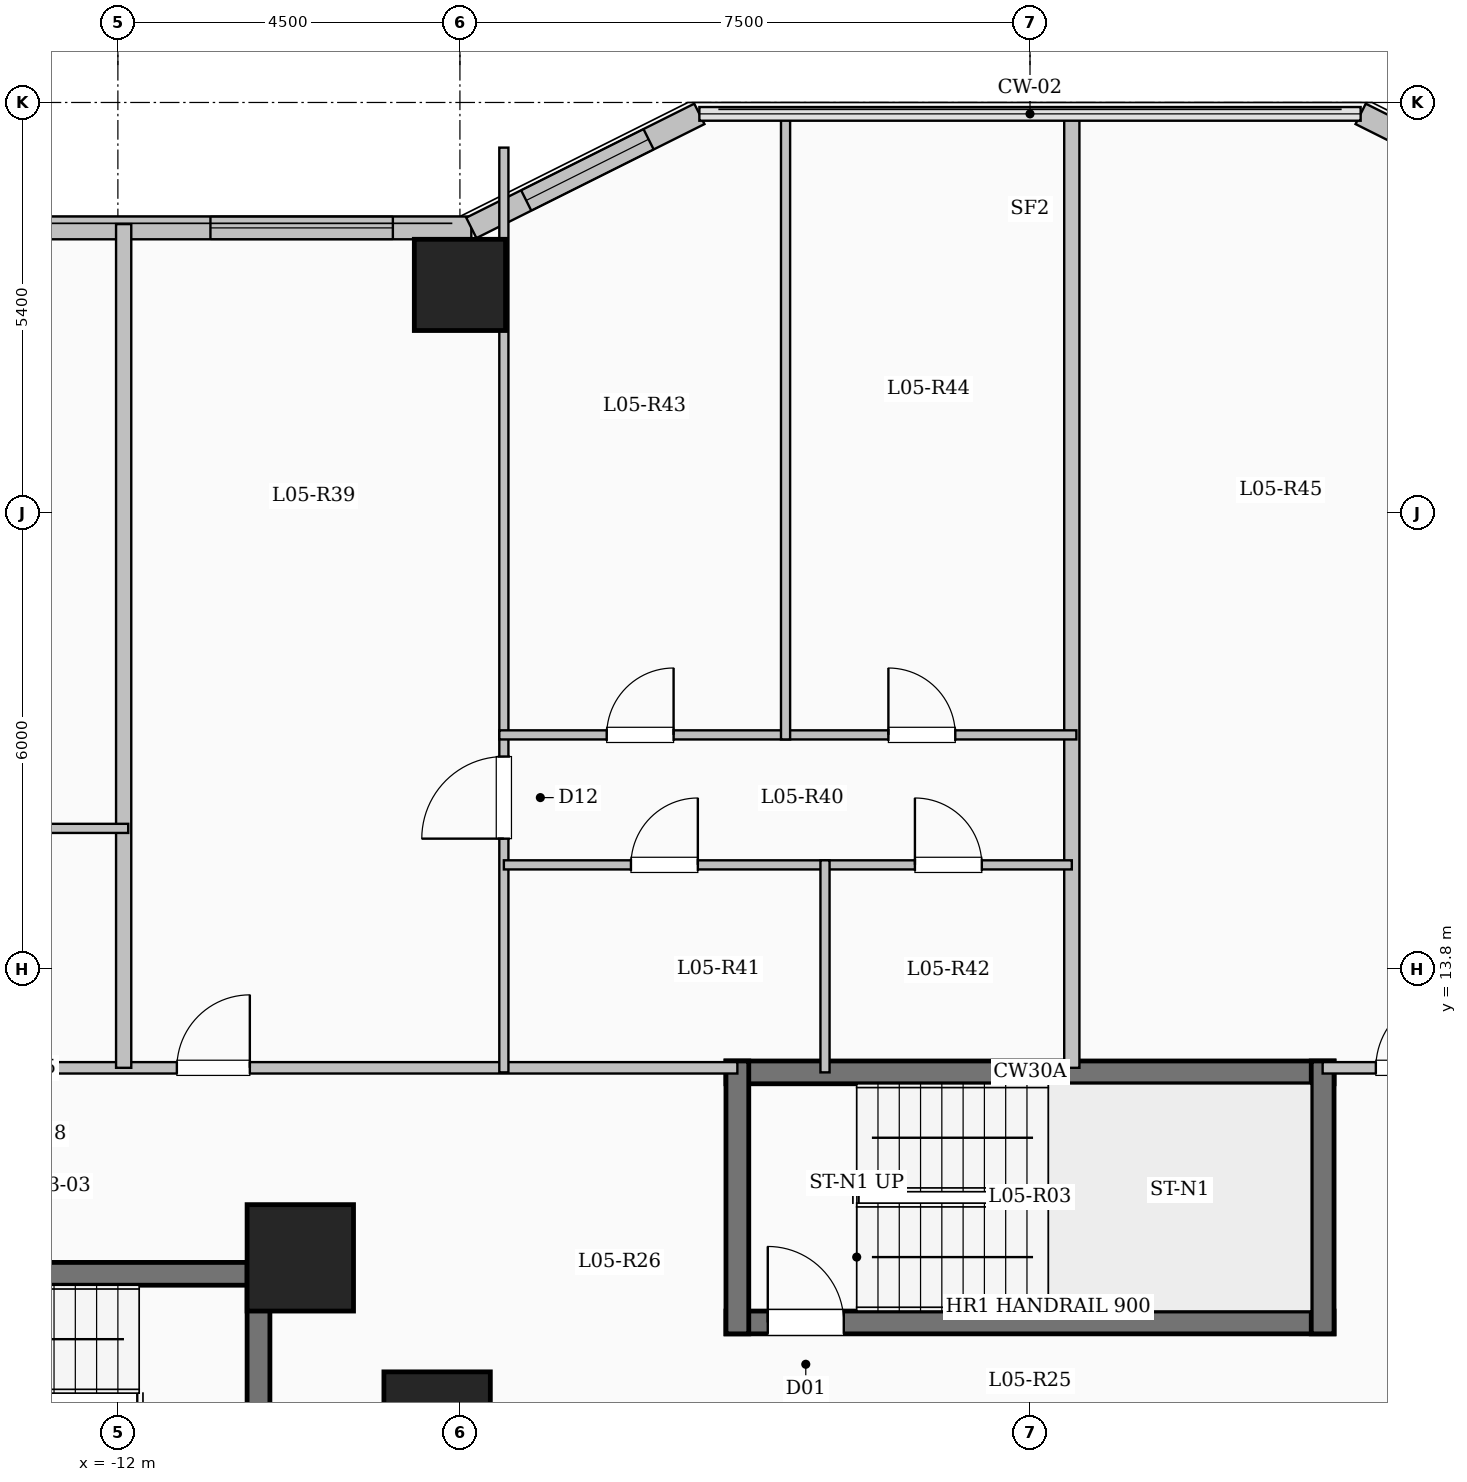
"""IFC4 building model, lengths in metres.
Left out: names, types, materials, properties, quantities, classifications, styles, units other than length and angle.
Written with IfcOpenShell. Run it as: python <this file> out.ifc"""

import sys

from ifc_helpers import new_model, si_unit, direction, frame, frame_2d, origin, origin_2d, place, context, subcontext, project, spatial, rectangle, extrude, element, fill, save


model = new_model("IFC4")
c1 = context("Model", 3, precision=1e-05, world=origin(), true_north=direction((0.0, 1.0)))
c2 = subcontext(c1, "Body", "Model", "MODEL_VIEW")
j1 = project(units=[si_unit("LENGTHUNIT", "METRE"), si_unit("PLANEANGLEUNIT", "RADIAN")], contexts=[c1])
p1 = place(None, origin())
s1 = spatial("IfcSite", under=j1, at=p1, CompositionType="ELEMENT")
p2 = place(p1, origin())
s2 = spatial("IfcBuilding", under=s1, at=p2, CompositionType="ELEMENT")
p3 = place(p2, frame((0.0, 0.0, 24.0)))
s3 = spatial("IfcBuildingStorey", under=s2, at=p3, CompositionType="ELEMENT", Elevation=24.0)
for number, where, z_axis, x_axis in (
    (1, (-7.8, 7.8, 0.0), (0.0, 0.0, 1.0), (1.0, 0.0, 0.0)),
    (2, (-9.6, 10.0, 0.0), (0.0, 0.0, 1.0), (1.0, 0.0, 0.0)),
):
    element("IfcColumn", number, at=place(p3, frame(where, z_axis=z_axis, x_axis=x_axis)), inside=s3, PredefinedType="COLUMN", context=c2, shape_type="SweptSolid", body=[
        extrude(rectangle(XDim=1.4, YDim=1.4, at=origin_2d()), origin(), (0.0, 0.0, 1.0), 3.35),
    ])
p4 = place(p3, frame((-7.5, 22.8, 0.0), z_axis=(0.0, 0.0, 1.0), x_axis=(1.0, 0.0, 0.0)))
e3 = element("IfcColumn", 3, at=p4, inside=s3, PredefinedType="COLUMN", context=c2, shape_type="SweptSolid", body=[
    extrude(rectangle(XDim=1.2, YDim=1.2, at=origin_2d()), origin(), (0.0, 0.0, 1.0), 3.35),
])
p5 = place(p3, frame((-22.65, 23.55, 0.0), z_axis=(0.0, 0.0, 1.0), x_axis=(1.0, 0.0, 0.0)))
e4 = element("IfcWall", 4, at=p5, inside=s3, PredefinedType="SOLIDWALL", context=c2, shape_type="SweptSolid", body=[
    extrude(rectangle(XDim=15.3, YDim=0.3, at=frame_2d((7.65, 0.0))), origin(), (0.0, 0.0, 1.0), 3.1),
])
p6 = place(p5, frame((1.81, 0.0, 0.9)))
e5 = element("IfcOpeningElement", 5, at=p6, cuts=e4, PredefinedType="OPENING", context=c2, shape_type="SweptSolid", body=[
    extrude(rectangle(XDim=2.4, YDim=1.8, at=frame_2d((1.2, 0.9))), frame((0.0, 0.16, 0.0), z_axis=(0.0, -1.0, 0.0), x_axis=(1.0, 0.0, 0.0)), (0.0, 0.0, 1.0), 0.32),
])
p7 = place(p5, frame((7.427, 0.0, 0.9)))
e6 = element("IfcOpeningElement", 6, at=p7, cuts=e4, PredefinedType="OPENING", context=c2, shape_type="SweptSolid", body=[
    extrude(rectangle(XDim=1.8, YDim=1.65, at=frame_2d((0.9, 0.825))), frame((0.0, 0.16, 0.0), z_axis=(0.0, -1.0, 0.0), x_axis=(1.0, 0.0, 0.0)), (0.0, 0.0, 1.0), 0.32),
])
p8 = place(p5, frame((11.868, 0.0, 0.9)))
e7 = element("IfcOpeningElement", 7, at=p8, cuts=e4, PredefinedType="OPENING", context=c2, shape_type="SweptSolid", body=[
    extrude(rectangle(XDim=2.4, YDim=1.8, at=frame_2d((1.2, 0.9))), frame((0.0, 0.16, 0.0), z_axis=(0.0, -1.0, 0.0), x_axis=(1.0, 0.0, 0.0)), (0.0, 0.0, 1.0), 0.32),
])
p9 = place(p3, frame((-7.35, 23.55, 0.0), z_axis=(0.0, 0.0, 1.0), x_axis=(0.894427191, 0.4472135955, 0.0)))
e8 = element("IfcWall", 8, at=p9, inside=s3, PredefinedType="SOLIDWALL", context=c2, shape_type="SweptSolid", body=[
    extrude(rectangle(XDim=3.354, YDim=0.3, at=frame_2d((1.677, 0.0))), origin(), (0.0, 0.0, 1.0), 3.1),
])
p10 = place(p9, frame((0.807, 0.0, 0.9)))
e9 = element("IfcOpeningElement", 9, at=p10, cuts=e8, PredefinedType="OPENING", context=c2, shape_type="SweptSolid", body=[
    extrude(rectangle(XDim=1.8, YDim=1.65, at=frame_2d((0.9, 0.825))), frame((0.0, 0.16, 0.0), z_axis=(0.0, -1.0, 0.0), x_axis=(1.0, 0.0, 0.0)), (0.0, 0.0, 1.0), 0.32),
])
p11 = place(p3, frame((4.35, 25.05, 0.0), z_axis=(0.0, 0.0, 1.0), x_axis=(0.894427191, -0.4472135955, 0.0)))
e10 = element("IfcWall", 10, at=p11, inside=s3, PredefinedType="SOLIDWALL", context=c2, shape_type="SweptSolid", body=[
    extrude(rectangle(XDim=3.354, YDim=0.3, at=frame_2d((1.677, 0.0))), origin(), (0.0, 0.0, 1.0), 3.1),
])
p12 = place(p11, frame((2.308, 0.0, 0.95)))
e11 = element("IfcOpeningElement", 11, at=p12, cuts=e10, PredefinedType="OPENING", context=c2, shape_type="SweptSolid", body=[
    extrude(rectangle(XDim=0.7, YDim=1.5, at=frame_2d((0.35, 0.75))), frame((0.0, 0.16, 0.0), z_axis=(0.0, -1.0, 0.0), x_axis=(1.0, 0.0, 0.0)), (0.0, 0.0, 1.0), 0.32),
])
p13 = place(p3, frame((-18.0, 9.79, 0.0), z_axis=(0.0, 0.0, 1.0), x_axis=(1.0, 0.0, 0.0)))
e12 = element("IfcWall", 12, at=p13, inside=s3, PredefinedType="SHEAR", context=c2, shape_type="SweptSolid", body=[
    extrude(rectangle(XDim=8.0, YDim=0.3, at=frame_2d((4.0, 0.0))), origin(), (0.0, 0.0, 1.0), 3.35),
])
p14 = place(p3, frame((-10.15, 6.35, 0.0), z_axis=(0.0, 0.0, 1.0), x_axis=(0.0, 1.0, 0.0)))
e13 = element("IfcWall", 13, at=p14, inside=s3, PredefinedType="SHEAR", context=c2, shape_type="SweptSolid", body=[
    extrude(rectangle(XDim=3.59, YDim=0.3, at=frame_2d((1.795, 0.0))), origin(), (0.0, 0.0, 1.0), 3.35),
])
p15 = place(p3, frame((-4.0, 12.44, 0.0), z_axis=(0.0, 0.0, 1.0), x_axis=(1.0, 0.0, 0.0)))
e14 = element("IfcWall", 14, at=p15, inside=s3, PredefinedType="SHEAR", context=c2, shape_type="SweptSolid", body=[
    extrude(rectangle(XDim=8.0, YDim=0.3, at=frame_2d((4.0, 0.0))), origin(), (0.0, 0.0, 1.0), 3.35),
])
p16 = place(p3, frame((-4.0, 9.15, 0.0), z_axis=(0.0, 0.0, 1.0), x_axis=(1.0, 0.0, 0.0)))
e15 = element("IfcWall", 15, at=p16, inside=s3, PredefinedType="SHEAR", context=c2, shape_type="SweptSolid", body=[
    extrude(rectangle(XDim=8.0, YDim=0.3, at=frame_2d((4.0, 0.0))), origin(), (0.0, 0.0, 1.0), 3.35),
])
p17 = place(p16, frame((0.55, 0.0, 0.0)))
e16 = element("IfcOpeningElement", 16, at=p17, cuts=e15, PredefinedType="OPENING", context=c2, shape_type="SweptSolid", body=[
    extrude(rectangle(XDim=1.0, YDim=2.15, at=frame_2d((0.5, 1.075))), frame((0.0, 0.16, 0.0), z_axis=(0.0, -1.0, 0.0), x_axis=(1.0, 0.0, 0.0)), (0.0, 0.0, 1.0), 0.32),
])
for number, where, z_axis, x_axis in (
    (17, (-3.85, 9.0, 0.0), (0.0, 0.0, 1.0), (0.0, 1.0, 0.0)),
    (18, (3.85, 9.0, 0.0), (0.0, 0.0, 1.0), (0.0, 1.0, 0.0)),
):
    element("IfcWall", number, at=place(p3, frame(where, z_axis=z_axis, x_axis=x_axis)), inside=s3, PredefinedType="SHEAR", context=c2, shape_type="SweptSolid", body=[
        extrude(rectangle(XDim=3.59, YDim=0.3, at=frame_2d((1.795, 0.0))), origin(), (0.0, 0.0, 1.0), 3.35),
    ])
p18 = place(p3, frame((-22.55, 12.5, 0.0), z_axis=(0.0, 0.0, 1.0), x_axis=(1.0, 0.0, 0.0)))
e19 = element("IfcWall", 19, at=p18, inside=s3, PredefinedType="PARTITIONING", context=c2, shape_type="SweptSolid", body=[
    extrude(rectangle(XDim=18.7, YDim=0.15, at=frame_2d((9.35, 0.0))), origin(), (0.0, 0.0, 1.0), 3.1),
])
p19 = place(p18, frame((0.7, 0.0, 0.0)))
e20 = element("IfcOpeningElement", 20, at=p19, cuts=e19, PredefinedType="OPENING", context=c2, shape_type="SweptSolid", body=[
    extrude(rectangle(XDim=0.96, YDim=2.15, at=frame_2d((0.48, 1.075))), frame((0.0, 0.085, 0.0), z_axis=(0.0, -1.0, 0.0), x_axis=(1.0, 0.0, 0.0)), (0.0, 0.0, 1.0), 0.17),
])
p20 = place(p18, frame((11.326, 0.0, 0.0)))
e21 = element("IfcOpeningElement", 21, at=p20, cuts=e19, PredefinedType="OPENING", context=c2, shape_type="SweptSolid", body=[
    extrude(rectangle(XDim=0.96, YDim=2.15, at=frame_2d((0.48, 1.075))), frame((0.0, 0.085, 0.0), z_axis=(0.0, -1.0, 0.0), x_axis=(1.0, 0.0, 0.0)), (0.0, 0.0, 1.0), 0.17),
])
p21 = place(p3, frame((3.85, 12.5, 0.0), z_axis=(0.0, 0.0, 1.0), x_axis=(1.0, 0.0, 0.0)))
e22 = element("IfcWall", 22, at=p21, inside=s3, PredefinedType="PARTITIONING", context=c2, shape_type="SweptSolid", body=[
    extrude(rectangle(XDim=18.7, YDim=0.15, at=frame_2d((9.35, 0.0))), origin(), (0.0, 0.0, 1.0), 3.1),
])
p22 = place(p21, frame((0.7, 0.0, 0.0)))
e23 = element("IfcOpeningElement", 23, at=p22, cuts=e22, PredefinedType="OPENING", context=c2, shape_type="SweptSolid", body=[
    extrude(rectangle(XDim=0.96, YDim=2.15, at=frame_2d((0.48, 1.075))), frame((0.0, 0.085, 0.0), z_axis=(0.0, -1.0, 0.0), x_axis=(1.0, 0.0, 0.0)), (0.0, 0.0, 1.0), 0.17),
])
p23 = place(p21, frame((8.4, 0.0, 0.0)))
e24 = element("IfcOpeningElement", 24, at=p23, cuts=e22, PredefinedType="OPENING", context=c2, shape_type="SweptSolid", body=[
    extrude(rectangle(XDim=0.96, YDim=2.15, at=frame_2d((0.48, 1.075))), frame((0.0, 0.085, 0.0), z_axis=(0.0, -1.0, 0.0), x_axis=(1.0, 0.0, 0.0)), (0.0, 0.0, 1.0), 0.17),
])
p24 = place(p3, frame((0.55, 12.5, 0.0), z_axis=(0.0, 0.0, 1.0), x_axis=(0.0, 1.0, 0.0)))
e25 = element("IfcWall", 25, at=p24, inside=s3, PredefinedType="SOLIDWALL", context=c2, shape_type="SweptSolid", body=[
    extrude(rectangle(XDim=12.58, YDim=0.2, at=frame_2d((6.29, 0.0))), origin(), (0.0, 0.0, 1.0), 3.1),
])
p25 = place(p3, frame((-11.924, 12.5, 0.0), z_axis=(0.0, 0.0, 1.0), x_axis=(0.0, 1.0, 0.0)))
e26 = element("IfcWall", 26, at=p25, inside=s3, PredefinedType="SOLIDWALL", context=c2, shape_type="SweptSolid", body=[
    extrude(rectangle(XDim=11.1, YDim=0.2, at=frame_2d((5.55, 0.0))), origin(), (0.0, 0.0, 1.0), 3.1),
])
p26 = place(p3, frame((-16.744, 15.65, 0.0), z_axis=(0.0, 0.0, 1.0), x_axis=(1.0, 0.0, 0.0)))
e27 = element("IfcWall", 27, at=p26, inside=s3, PredefinedType="PARTITIONING", context=c2, shape_type="SweptSolid", body=[
    extrude(rectangle(XDim=4.88, YDim=0.12, at=frame_2d((2.44, 0.0))), origin(), (0.0, 0.0, 1.0), 3.1),
])
p27 = place(p3, frame((-6.922, 12.44, 0.0), z_axis=(0.0, 0.0, 1.0), x_axis=(0.0, 1.0, 0.0)))
e28 = element("IfcWall", 28, at=p27, inside=s3, PredefinedType="PARTITIONING", context=c2, shape_type="SweptSolid", body=[
    extrude(rectangle(XDim=12.166, YDim=0.12, at=frame_2d((6.083, 0.0))), origin(), (0.0, 0.0, 1.0), 3.1),
])
p28 = place(p27, frame((3.075, 0.0, 0.0)))
e29 = element("IfcOpeningElement", 29, at=p28, cuts=e28, PredefinedType="OPENING", context=c2, shape_type="SweptSolid", body=[
    extrude(rectangle(XDim=1.08, YDim=2.15, at=frame_2d((0.54, 1.075))), frame((0.0, 0.07, 0.0), z_axis=(0.0, -1.0, 0.0), x_axis=(1.0, 0.0, 0.0)), (0.0, 0.0, 1.0), 0.14),
])
p29 = place(p3, frame((-6.922, 15.17, 0.0), z_axis=(0.0, 0.0, 1.0), x_axis=(1.0, 0.0, 0.0)))
e30 = element("IfcWall", 30, at=p29, inside=s3, PredefinedType="PARTITIONING", context=c2, shape_type="SweptSolid", body=[
    extrude(rectangle(XDim=4.225, YDim=0.12, at=frame_2d((2.113, 0.0))), origin(), (0.0, 0.0, 1.0), 3.1),
])
p30 = place(p29, frame((1.672, 0.0, 0.0)))
e31 = element("IfcOpeningElement", 31, at=p30, cuts=e30, PredefinedType="OPENING", context=c2, shape_type="SweptSolid", body=[
    extrude(rectangle(XDim=0.88, YDim=2.1, at=frame_2d((0.44, 1.05))), frame((0.0, 0.07, 0.0), z_axis=(0.0, -1.0, 0.0), x_axis=(1.0, 0.0, 0.0)), (0.0, 0.0, 1.0), 0.14),
])
p31 = place(p3, frame((-2.697, 15.17, 0.0), z_axis=(0.0, 0.0, 1.0), x_axis=(1.0, 0.0, 0.0)))
e32 = element("IfcWall", 32, at=p31, inside=s3, PredefinedType="PARTITIONING", context=c2, shape_type="SweptSolid", body=[
    extrude(rectangle(XDim=3.247, YDim=0.12, at=frame_2d((1.624, 0.0))), origin(), (0.0, 0.0, 1.0), 3.1),
])
p32 = place(p31, frame((1.183, 0.0, 0.0)))
e33 = element("IfcOpeningElement", 33, at=p32, cuts=e32, PredefinedType="OPENING", context=c2, shape_type="SweptSolid", body=[
    extrude(rectangle(XDim=0.88, YDim=2.1, at=frame_2d((0.44, 1.05))), frame((0.0, 0.07, 0.0), z_axis=(0.0, -1.0, 0.0), x_axis=(1.0, 0.0, 0.0)), (0.0, 0.0, 1.0), 0.14),
])
p33 = place(p3, frame((-6.982, 16.88, 0.0), z_axis=(0.0, 0.0, 1.0), x_axis=(1.0, 0.0, 0.0)))
e34 = element("IfcWall", 34, at=p33, inside=s3, PredefinedType="PARTITIONING", context=c2, shape_type="SweptSolid", body=[
    extrude(rectangle(XDim=7.592, YDim=0.12, at=frame_2d((3.796, 0.0))), origin(), (0.0, 0.0, 1.0), 3.1),
])
p34 = place(p33, frame((1.413, 0.0, 0.0)))
e35 = element("IfcOpeningElement", 35, at=p34, cuts=e34, PredefinedType="OPENING", context=c2, shape_type="SweptSolid", body=[
    extrude(rectangle(XDim=0.88, YDim=2.1, at=frame_2d((0.44, 1.05))), frame((0.0, 0.07, 0.0), z_axis=(0.0, -1.0, 0.0), x_axis=(1.0, 0.0, 0.0)), (0.0, 0.0, 1.0), 0.14),
])
p35 = place(p33, frame((5.119, 0.0, 0.0)))
e36 = element("IfcOpeningElement", 36, at=p35, cuts=e34, PredefinedType="OPENING", context=c2, shape_type="SweptSolid", body=[
    extrude(rectangle(XDim=0.88, YDim=2.1, at=frame_2d((0.44, 1.05))), frame((0.0, 0.07, 0.0), z_axis=(0.0, -1.0, 0.0), x_axis=(1.0, 0.0, 0.0)), (0.0, 0.0, 1.0), 0.14),
])
p36 = place(p3, frame((-2.697, 12.44, 0.0), z_axis=(0.0, 0.0, 1.0), x_axis=(0.0, 1.0, 0.0)))
e37 = element("IfcWall", 37, at=p36, inside=s3, PredefinedType="PARTITIONING", context=c2, shape_type="SweptSolid", body=[
    extrude(rectangle(XDim=2.79, YDim=0.12, at=frame_2d((1.395, 0.0))), origin(), (0.0, 0.0, 1.0), 3.1),
])
p37 = place(p3, frame((-3.216, 16.82, 0.0), z_axis=(0.0, 0.0, 1.0), x_axis=(0.0, 1.0, 0.0)))
e38 = element("IfcWall", 38, at=p37, inside=s3, PredefinedType="PARTITIONING", context=c2, shape_type="SweptSolid", body=[
    extrude(rectangle(XDim=8.26, YDim=0.12, at=frame_2d((4.13, 0.0))), origin(), (0.0, 0.0, 1.0), 3.1),
])
p38 = place(p8, origin())
e39 = element("IfcWindow", 39, at=p38, inside=s3, PartitioningType="SINGLE_PANEL", PredefinedType="WINDOW", context=c2, shape_type="SweptSolid", body=[
    extrude(rectangle(XDim=2.4, YDim=1.8, at=frame_2d((1.2, 0.9))), frame((0.0, 0.03, 0.0), z_axis=(0.0, -1.0, 0.0), x_axis=(1.0, 0.0, 0.0)), (0.0, 0.0, 1.0), 0.06),
])
fill(e7, e39)
p39 = place(p10, origin())
e40 = element("IfcWindow", 40, at=p39, inside=s3, PartitioningType="SINGLE_PANEL", PredefinedType="WINDOW", context=c2, shape_type="SweptSolid", body=[
    extrude(rectangle(XDim=1.8, YDim=1.65, at=frame_2d((0.9, 0.825))), frame((0.0, 0.03, 0.0), z_axis=(0.0, -1.0, 0.0), x_axis=(1.0, 0.0, 0.0)), (0.0, 0.0, 1.0), 0.06),
])
fill(e9, e40)
p40 = place(p17, origin())
e41 = element("IfcDoor", 41, at=p40, inside=s3, OperationType="SINGLE_SWING_LEFT", PredefinedType="DOOR", context=c2, shape_type="SweptSolid", body=[
    extrude(rectangle(XDim=1.0, YDim=2.15, at=frame_2d((0.5, 1.075))), frame((0.0, 0.025, 0.0), z_axis=(0.0, -1.0, 0.0), x_axis=(1.0, 0.0, 0.0)), (0.0, 0.0, 1.0), 0.05),
])
fill(e16, e41)
p41 = place(p20, origin())
e42 = element("IfcDoor", 42, at=p41, inside=s3, OperationType="SINGLE_SWING_RIGHT", PredefinedType="DOOR", context=c2, shape_type="SweptSolid", body=[
    extrude(rectangle(XDim=0.96, YDim=2.15, at=frame_2d((0.48, 1.075))), frame((0.0, 0.025, 0.0), z_axis=(0.0, -1.0, 0.0), x_axis=(1.0, 0.0, 0.0)), (0.0, 0.0, 1.0), 0.05),
])
fill(e21, e42)
p42 = place(p28, origin())
e43 = element("IfcDoor", 43, at=p42, inside=s3, OperationType="SINGLE_SWING_LEFT", PredefinedType="DOOR", context=c2, shape_type="SweptSolid", body=[
    extrude(rectangle(XDim=1.08, YDim=2.15, at=frame_2d((0.54, 1.075))), frame((0.0, 0.025, 0.0), z_axis=(0.0, -1.0, 0.0), x_axis=(1.0, 0.0, 0.0)), (0.0, 0.0, 1.0), 0.05),
])
fill(e29, e43)
p43 = place(p30, origin())
e44 = element("IfcDoor", 44, at=p43, inside=s3, OperationType="SINGLE_SWING_RIGHT", PredefinedType="DOOR", context=c2, shape_type="SweptSolid", body=[
    extrude(rectangle(XDim=0.88, YDim=2.1, at=frame_2d((0.44, 1.05))), frame((0.0, 0.025, 0.0), z_axis=(0.0, -1.0, 0.0), x_axis=(1.0, 0.0, 0.0)), (0.0, 0.0, 1.0), 0.05),
])
fill(e31, e44)
p44 = place(p32, origin())
e45 = element("IfcDoor", 45, at=p44, inside=s3, OperationType="SINGLE_SWING_LEFT", PredefinedType="DOOR", context=c2, shape_type="SweptSolid", body=[
    extrude(rectangle(XDim=0.88, YDim=2.1, at=frame_2d((0.44, 1.05))), frame((0.0, 0.025, 0.0), z_axis=(0.0, -1.0, 0.0), x_axis=(1.0, 0.0, 0.0)), (0.0, 0.0, 1.0), 0.05),
])
fill(e33, e45)
p45 = place(p34, origin())
e46 = element("IfcDoor", 46, at=p45, inside=s3, OperationType="SINGLE_SWING_RIGHT", PredefinedType="DOOR", context=c2, shape_type="SweptSolid", body=[
    extrude(rectangle(XDim=0.88, YDim=2.1, at=frame_2d((0.44, 1.05))), frame((0.0, 0.025, 0.0), z_axis=(0.0, -1.0, 0.0), x_axis=(1.0, 0.0, 0.0)), (0.0, 0.0, 1.0), 0.05),
])
fill(e35, e46)
p46 = place(p35, origin())
e47 = element("IfcDoor", 47, at=p46, inside=s3, OperationType="SINGLE_SWING_LEFT", PredefinedType="DOOR", context=c2, shape_type="SweptSolid", body=[
    extrude(rectangle(XDim=0.88, YDim=2.1, at=frame_2d((0.44, 1.05))), frame((0.0, 0.025, 0.0), z_axis=(0.0, -1.0, 0.0), x_axis=(1.0, 0.0, 0.0)), (0.0, 0.0, 1.0), 0.05),
])
fill(e36, e47)
p47 = place(p22, origin())
e48 = element("IfcDoor", 48, at=p47, inside=s3, OperationType="SINGLE_SWING_RIGHT", PredefinedType="DOOR", context=c2, shape_type="SweptSolid", body=[
    extrude(rectangle(XDim=0.96, YDim=2.15, at=frame_2d((0.48, 1.075))), frame((0.0, 0.025, 0.0), z_axis=(0.0, -1.0, 0.0), x_axis=(1.0, 0.0, 0.0)), (0.0, 0.0, 1.0), 0.05),
])
fill(e23, e48)
save(model, sys.argv[1])
